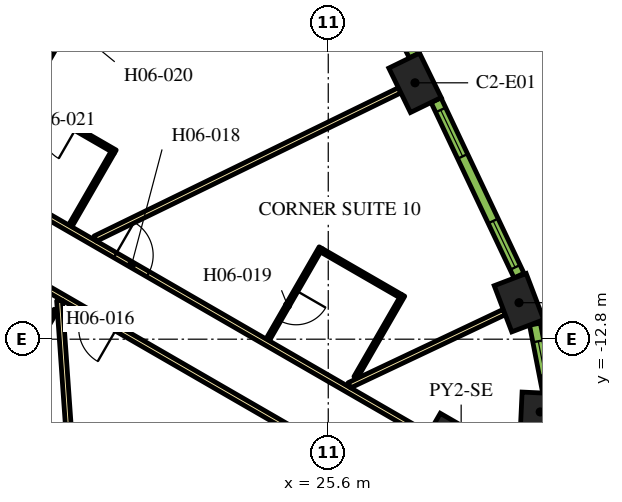
"""IFC4 building model, lengths in metres.
Left out: names, types, materials, properties, quantities, classifications, styles, units other than length and angle.
Written with IfcOpenShell. Run it as: python <this file> out.ifc"""

import sys

from ifc_helpers import new_model, si_unit, direction, frame, frame_2d, origin, origin_2d, place, context, subcontext, project, spatial, rectangle, extrude, element, fill, save


model = new_model("IFC4")
c1 = context("Model", 3, precision=1e-05, world=origin(), true_north=direction((0.0, 1.0)))
c2 = subcontext(c1, "Body", "Model", "MODEL_VIEW")
j1 = project(units=[si_unit("LENGTHUNIT", "METRE"), si_unit("PLANEANGLEUNIT", "RADIAN")], contexts=[c1])
p1 = place(None, origin())
s1 = spatial("IfcSite", under=j1, at=p1, CompositionType="ELEMENT")
p2 = place(p1, origin())
s2 = spatial("IfcBuilding", under=s1, at=p2, CompositionType="ELEMENT")
p3 = place(p2, frame((0.0, 0.0, 87.6)))
s3 = spatial("IfcBuildingStorey", under=s2, at=p3, CompositionType="ELEMENT", Elevation=87.6)
p4 = place(p3, frame((29.097, -16.799, 0.0), z_axis=(0.0, 0.0, 1.0), x_axis=(0.866025403784, -0.5, 0.0)))
e1 = element("IfcColumn", 1, at=p4, inside=s3, PredefinedType="COLUMN", context=c2, shape_type="SweptSolid", body=[
    extrude(rectangle(XDim=3.0, YDim=3.0, at=origin_2d()), origin(), (0.0, 0.0, 1.0), 3.9),
])
p5 = place(p3, frame((31.177, -14.714, 0.0), z_axis=(0.0, 0.0, 1.0), x_axis=(0.046756026083, 0.998906338965, 0.0)))
e2 = element("IfcColumn", 2, at=p5, inside=s3, PredefinedType="COLUMN", context=c2, shape_type="SweptSolid", body=[
    extrude(rectangle(XDim=1.0, YDim=1.0, at=origin_2d()), origin(), (0.0, 0.0, 1.0), 3.9),
])
for number, where, z_axis, x_axis in (
    (3, (30.619, -11.839, 0.0), (0.0, 0.0, 1.0), (-0.355, 0.935, 0.0)),
    (4, (27.883, -6.054, 0.0), (0.0, 0.0, 1.0), (-0.438, 0.899, 0.0)),
):
    element("IfcColumn", number, at=place(p3, frame(where, z_axis=z_axis, x_axis=x_axis)), inside=s3, PredefinedType="COLUMN", context=c2, shape_type="SweptSolid", body=[
        extrude(rectangle(XDim=1.3, YDim=0.9, at=origin_2d()), origin(), (0.0, 0.0, 1.0), 3.9),
    ])
p6 = place(p3, frame((16.412, -8.523, 0.0), z_axis=(0.0, 0.0, 1.0), x_axis=(0.866025629663, -0.499999608766, 0.0)))
e5 = element("IfcWall", 5, at=p6, inside=s3, PredefinedType="PARTITIONING", context=c2, shape_type="SweptSolid", body=[
    extrude(rectangle(XDim=13.624, YDim=0.15, at=frame_2d((6.812, 0.0))), origin(), (0.0, 0.0, 1.0), 2.75),
])
p7 = place(p6, frame((4.134, 0.0, 0.0)))
e6 = element("IfcOpeningElement", 6, at=p7, cuts=e5, PredefinedType="OPENING", context=c2, shape_type="SweptSolid", body=[
    extrude(rectangle(XDim=1.0, YDim=2.1, at=frame_2d((0.5, 1.05))), frame((0.0, 0.085, 0.0), z_axis=(0.0, -1.0, 0.0), x_axis=(1.0, 0.0, 0.0)), (0.0, 0.0, 1.0), 0.17),
])
p8 = place(p3, frame((19.081, -3.9, 0.0), z_axis=(0.0, 0.0, 1.0), x_axis=(-0.499974327079, -0.866040225545, 0.0)))
e7 = element("IfcWall", 7, at=p8, inside=s3, PredefinedType="PARTITIONING", context=c2, shape_type="SweptSolid", body=[
    extrude(rectangle(XDim=5.258, YDim=0.15, at=frame_2d((2.629, 0.0))), origin(), (0.0, 0.0, 1.0), 2.75),
])
p9 = place(p8, frame((0.18, 0.0, 0.0)))
e8 = element("IfcOpeningElement", 8, at=p9, cuts=e7, PredefinedType="OPENING", context=c2, shape_type="SweptSolid", body=[
    extrude(rectangle(XDim=1.0, YDim=2.1, at=frame_2d((0.5, 1.05))), frame((0.0, 0.085, 0.0), z_axis=(0.0, -1.0, 0.0), x_axis=(1.0, 0.0, 0.0)), (0.0, 0.0, 1.0), 0.17),
])
p10 = place(p3, frame((27.386, -16.764, 0.0), z_axis=(0.0, 0.0, 1.0), x_axis=(-0.866022585856, 0.500004880763, 0.0)))
e9 = element("IfcWall", 9, at=p10, inside=s3, PredefinedType="PARTITIONING", context=c2, shape_type="SweptSolid", body=[
    extrude(rectangle(XDim=13.544, YDim=0.15, at=frame_2d((6.772, 0.0))), origin(), (0.0, 0.0, 1.0), 2.75),
])
p11 = place(p10, frame((12.214, 0.0, 0.0)))
e10 = element("IfcOpeningElement", 10, at=p11, cuts=e9, PredefinedType="OPENING", context=c2, shape_type="SweptSolid", body=[
    extrude(rectangle(XDim=1.0, YDim=2.1, at=frame_2d((0.5, 1.05))), frame((0.0, 0.085, 0.0), z_axis=(0.0, -1.0, 0.0), x_axis=(1.0, 0.0, 0.0)), (0.0, 0.0, 1.0), 0.17),
])
p12 = place(p10, frame((8.49, 0.0, 0.0)))
e11 = element("IfcOpeningElement", 11, at=p12, cuts=e9, PredefinedType="OPENING", context=c2, shape_type="SweptSolid", body=[
    extrude(rectangle(XDim=1.0, YDim=2.1, at=frame_2d((0.5, 1.05))), frame((0.0, 0.085, 0.0), z_axis=(0.0, -1.0, 0.0), x_axis=(1.0, 0.0, 0.0)), (0.0, 0.0, 1.0), 0.17),
])
p13 = place(p3, frame((19.153, -20.671, 0.0), z_axis=(0.0, 0.0, 1.0), x_axis=(-0.070070736723, 0.997542025107, 0.0)))
e12 = element("IfcWall", 12, at=p13, inside=s3, PredefinedType="PARTITIONING", context=c2, shape_type="SweptSolid", body=[
    extrude(rectangle(XDim=8.909, YDim=0.15, at=frame_2d((4.455, 0.0))), origin(), (0.0, 0.0, 1.0), 2.75),
])
p14 = place(p3, frame((27.479, -6.251, 0.0), z_axis=(0.0, 0.0, 1.0), x_axis=(-0.898945877276, -0.438059710231, 0.0)))
e13 = element("IfcWall", 13, at=p14, inside=s3, PredefinedType="PARTITIONING", context=c2, shape_type="SweptSolid", body=[
    extrude(rectangle(XDim=8.909, YDim=0.15, at=frame_2d((4.455, 0.0))), origin(), (0.0, 0.0, 1.0), 2.75),
])
p15 = place(p3, frame((30.231, -12.085, 0.0), z_axis=(0.0, 0.0, 1.0), x_axis=(-0.904001132572, -0.427530060122, 0.0)))
e14 = element("IfcWall", 14, at=p15, inside=s3, PredefinedType="PARTITIONING", context=c2, shape_type="SweptSolid", body=[
    extrude(rectangle(XDim=4.51, YDim=0.15, at=frame_2d((2.255, 0.0))), origin(), (0.0, 0.0, 1.0), 2.75),
])
p16 = place(p3, frame((18.429, -12.037, 0.0), z_axis=(0.0, 0.0, 1.0), x_axis=(-0.500007957085, -0.86602080971, 0.0)))
e15 = element("IfcWall", 15, at=p16, inside=s3, PredefinedType="PARTITIONING", context=c2, shape_type="SweptSolid", body=[
    extrude(rectangle(XDim=2.64, YDim=0.1, at=frame_2d((1.32, 0.0))), origin(), (0.0, 0.0, 1.0), 2.75),
])
p17 = place(p3, frame((25.404, -10.395, 0.0), z_axis=(0.0, 0.0, 1.0), x_axis=(-0.500011755427, -0.866018616679, 0.0)))
e16 = element("IfcWall", 16, at=p17, inside=s3, PredefinedType="PARTITIONING", context=c2, shape_type="SweptSolid", body=[
    extrude(rectangle(XDim=2.8, YDim=0.1, at=frame_2d((1.4, 0.0))), origin(), (0.0, 0.0, 1.0), 2.75),
])
p18 = place(p17, frame((1.3, 0.0, 0.0)))
e17 = element("IfcOpeningElement", 17, at=p18, cuts=e16, PredefinedType="OPENING", context=c2, shape_type="SweptSolid", body=[
    extrude(rectangle(XDim=0.9, YDim=2.1, at=frame_2d((0.45, 1.05))), frame((0.0, 0.06, 0.0), z_axis=(0.0, -1.0, 0.0), x_axis=(1.0, 0.0, 0.0)), (0.0, 0.0, 1.0), 0.12),
])
p19 = place(p3, frame((25.422, -10.463, 0.0), z_axis=(0.0, 0.0, 1.0), x_axis=(0.866024647952, -0.500001309137, 0.0)))
e18 = element("IfcWall", 18, at=p19, inside=s3, PredefinedType="PARTITIONING", context=c2, shape_type="SweptSolid", body=[
    extrude(rectangle(XDim=2.4, YDim=0.1, at=frame_2d((1.2, 0.0))), origin(), (0.0, 0.0, 1.0), 2.75),
])
p20 = place(p3, frame((26.319, -13.81, 0.0), z_axis=(0.0, 0.0, 1.0), x_axis=(0.499961950354, 0.866047370643, 0.0)))
e19 = element("IfcWall", 19, at=p20, inside=s3, PredefinedType="PARTITIONING", context=c2, shape_type="SweptSolid", body=[
    extrude(rectangle(XDim=2.5, YDim=0.1, at=frame_2d((1.25, 0.0))), origin(), (0.0, 0.0, 1.0), 2.75),
])
p21 = place(p3, frame((19.996, -7.867, 0.0), z_axis=(0.0, 0.0, 1.0), x_axis=(-0.866019956843, 0.50000943426, 0.0)))
e20 = element("IfcWall", 20, at=p21, inside=s3, PredefinedType="PARTITIONING", context=c2, shape_type="SweptSolid", body=[
    extrude(rectangle(XDim=2.7, YDim=0.1, at=frame_2d((1.35, 0.0))), origin(), (0.0, 0.0, 1.0), 2.75),
])
p22 = place(p21, frame((1.2, 0.0, 0.0)))
e21 = element("IfcOpeningElement", 21, at=p22, cuts=e20, PredefinedType="OPENING", context=c2, shape_type="SweptSolid", body=[
    extrude(rectangle(XDim=0.9, YDim=2.1, at=frame_2d((0.45, 1.05))), frame((0.0, 0.06, 0.0), z_axis=(0.0, -1.0, 0.0), x_axis=(1.0, 0.0, 0.0)), (0.0, 0.0, 1.0), 0.12),
])
p23 = place(p3, frame((19.922, -7.894, 0.0), z_axis=(0.0, 0.0, 1.0), x_axis=(-0.499995378973, -0.866028071719, 0.0)))
e22 = element("IfcWall", 22, at=p23, inside=s3, PredefinedType="PARTITIONING", context=c2, shape_type="SweptSolid", body=[
    extrude(rectangle(XDim=2.22, YDim=0.1, at=frame_2d((1.11, 0.0))), origin(), (0.0, 0.0, 1.0), 2.75),
])
p24 = place(p3, frame((31.385, -14.189, 0.0), z_axis=(0.0, 0.0, 1.0), x_axis=(-0.190409913989, 0.981704672829, 0.0)))
e23 = element("IfcWall", 23, at=p24, inside=s3, PredefinedType="SOLIDWALL", context=c2, shape_type="SweptSolid", body=[
    extrude(rectangle(XDim=1.819, YDim=0.29, at=frame_2d((0.91, 0.0))), origin(), (0.0, 0.0, 1.0), 3.65),
])
p25 = place(p24, frame((0.46, 0.0, 0.9)))
e24 = element("IfcOpeningElement", 24, at=p25, cuts=e23, PredefinedType="OPENING", context=c2, shape_type="SweptSolid", body=[
    extrude(rectangle(XDim=0.9, YDim=2.15, at=frame_2d((0.45, 1.075))), frame((0.0, 0.155, 0.0), z_axis=(0.0, -1.0, 0.0), x_axis=(1.0, 0.0, 0.0)), (0.0, 0.0, 1.0), 0.31),
])
p26 = place(p3, frame((30.62, -11.127, 0.0), z_axis=(0.0, 0.0, 1.0), x_axis=(-0.427543726596, 0.903994669148, 0.0)))
e25 = element("IfcWall", 25, at=p26, inside=s3, PredefinedType="SOLIDWALL", context=c2, shape_type="SweptSolid", body=[
    extrude(rectangle(XDim=5.107, YDim=0.29, at=frame_2d((2.553, 0.0))), origin(), (0.0, 0.0, 1.0), 3.65),
])
p27 = place(p26, frame((0.24, 0.0, 0.9)))
e26 = element("IfcOpeningElement", 26, at=p27, cuts=e25, PredefinedType="OPENING", context=c2, shape_type="SweptSolid", body=[
    extrude(rectangle(XDim=1.35, YDim=2.15, at=frame_2d((0.675, 1.075))), frame((0.0, 0.155, 0.0), z_axis=(0.0, -1.0, 0.0), x_axis=(1.0, 0.0, 0.0)), (0.0, 0.0, 1.0), 0.31),
])
p28 = place(p26, frame((3.471, 0.0, 0.9)))
e27 = element("IfcOpeningElement", 27, at=p28, cuts=e25, PredefinedType="OPENING", context=c2, shape_type="SweptSolid", body=[
    extrude(rectangle(XDim=1.35, YDim=2.15, at=frame_2d((0.675, 1.075))), frame((0.0, 0.155, 0.0), z_axis=(0.0, -1.0, 0.0), x_axis=(1.0, 0.0, 0.0)), (0.0, 0.0, 1.0), 0.31),
])
p29 = place(p3, frame((27.864, -5.336, 0.0), z_axis=(0.0, 0.0, 1.0), x_axis=(-0.448534297211, 0.893765620409, 0.0)))
e28 = element("IfcWall", 28, at=p29, inside=s3, PredefinedType="SOLIDWALL", context=c2, shape_type="SweptSolid", body=[
    extrude(rectangle(XDim=5.1, YDim=0.29, at=frame_2d((2.55, 0.0))), origin(), (0.0, 0.0, 1.0), 3.65),
])
p30 = place(p29, frame((0.272, 0.0, 0.9)))
e29 = element("IfcOpeningElement", 29, at=p30, cuts=e28, PredefinedType="OPENING", context=c2, shape_type="SweptSolid", body=[
    extrude(rectangle(XDim=1.35, YDim=2.15, at=frame_2d((0.675, 1.075))), frame((0.0, 0.155, 0.0), z_axis=(0.0, -1.0, 0.0), x_axis=(1.0, 0.0, 0.0)), (0.0, 0.0, 1.0), 0.31),
])
p31 = place(p29, frame((3.478, 0.0, 0.9)))
e30 = element("IfcOpeningElement", 30, at=p31, cuts=e28, PredefinedType="OPENING", context=c2, shape_type="SweptSolid", body=[
    extrude(rectangle(XDim=1.35, YDim=2.15, at=frame_2d((0.675, 1.075))), frame((0.0, 0.155, 0.0), z_axis=(0.0, -1.0, 0.0), x_axis=(1.0, 0.0, 0.0)), (0.0, 0.0, 1.0), 0.31),
])
p32 = place(p12, origin())
e31 = element("IfcDoor", 31, at=p32, inside=s3, OperationType="SINGLE_SWING_RIGHT", PredefinedType="DOOR", context=c2, shape_type="SweptSolid", body=[
    extrude(rectangle(XDim=1.0, YDim=2.1, at=frame_2d((0.5, 1.05))), frame((0.0, 0.025, 0.0), z_axis=(0.0, -1.0, 0.0), x_axis=(1.0, 0.0, 0.0)), (0.0, 0.0, 1.0), 0.05),
])
fill(e11, e31)
p33 = place(p7, origin())
e32 = element("IfcDoor", 32, at=p33, inside=s3, OperationType="SINGLE_SWING_LEFT", PredefinedType="DOOR", context=c2, shape_type="SweptSolid", body=[
    extrude(rectangle(XDim=1.0, YDim=2.1, at=frame_2d((0.5, 1.05))), frame((0.0, 0.025, 0.0), z_axis=(0.0, -1.0, 0.0), x_axis=(1.0, 0.0, 0.0)), (0.0, 0.0, 1.0), 0.05),
])
fill(e6, e32)
p34 = place(p18, origin())
e33 = element("IfcDoor", 33, at=p34, inside=s3, OperationType="SINGLE_SWING_LEFT", PredefinedType="DOOR", context=c2, shape_type="SweptSolid", body=[
    extrude(rectangle(XDim=0.9, YDim=2.1, at=frame_2d((0.45, 1.05))), frame((0.0, 0.025, 0.0), z_axis=(0.0, -1.0, 0.0), x_axis=(1.0, 0.0, 0.0)), (0.0, 0.0, 1.0), 0.05),
])
fill(e17, e33)
p35 = place(p22, origin())
e34 = element("IfcDoor", 34, at=p35, inside=s3, OperationType="SINGLE_SWING_LEFT", PredefinedType="DOOR", context=c2, shape_type="SweptSolid", body=[
    extrude(rectangle(XDim=0.9, YDim=2.1, at=frame_2d((0.45, 1.05))), frame((0.0, 0.025, 0.0), z_axis=(0.0, -1.0, 0.0), x_axis=(1.0, 0.0, 0.0)), (0.0, 0.0, 1.0), 0.05),
])
fill(e21, e34)
p36 = place(p25, origin())
e35 = element("IfcWindow", 35, at=p36, inside=s3, PartitioningType="SINGLE_PANEL", PredefinedType="WINDOW", context=c2, shape_type="SweptSolid", body=[
    extrude(rectangle(XDim=0.9, YDim=2.15, at=frame_2d((0.45, 1.075))), frame((0.0, 0.015, 0.0), z_axis=(0.0, -1.0, 0.0), x_axis=(1.0, 0.0, 0.0)), (0.0, 0.0, 1.0), 0.06),
])
fill(e24, e35)
p37 = place(p27, origin())
e36 = element("IfcWindow", 36, at=p37, inside=s3, PartitioningType="DOUBLE_PANEL_VERTICAL", PredefinedType="WINDOW", context=c2, shape_type="SweptSolid", body=[
    extrude(rectangle(XDim=1.35, YDim=2.15, at=frame_2d((0.675, 1.075))), frame((0.0, 0.015, 0.0), z_axis=(0.0, -1.0, 0.0), x_axis=(1.0, 0.0, 0.0)), (0.0, 0.0, 1.0), 0.06),
])
fill(e26, e36)
p38 = place(p28, origin())
e37 = element("IfcWindow", 37, at=p38, inside=s3, PartitioningType="DOUBLE_PANEL_VERTICAL", PredefinedType="WINDOW", context=c2, shape_type="SweptSolid", body=[
    extrude(rectangle(XDim=1.35, YDim=2.15, at=frame_2d((0.675, 1.075))), frame((0.0, 0.015, 0.0), z_axis=(0.0, -1.0, 0.0), x_axis=(1.0, 0.0, 0.0)), (0.0, 0.0, 1.0), 0.06),
])
fill(e27, e37)
save(model, sys.argv[1])
